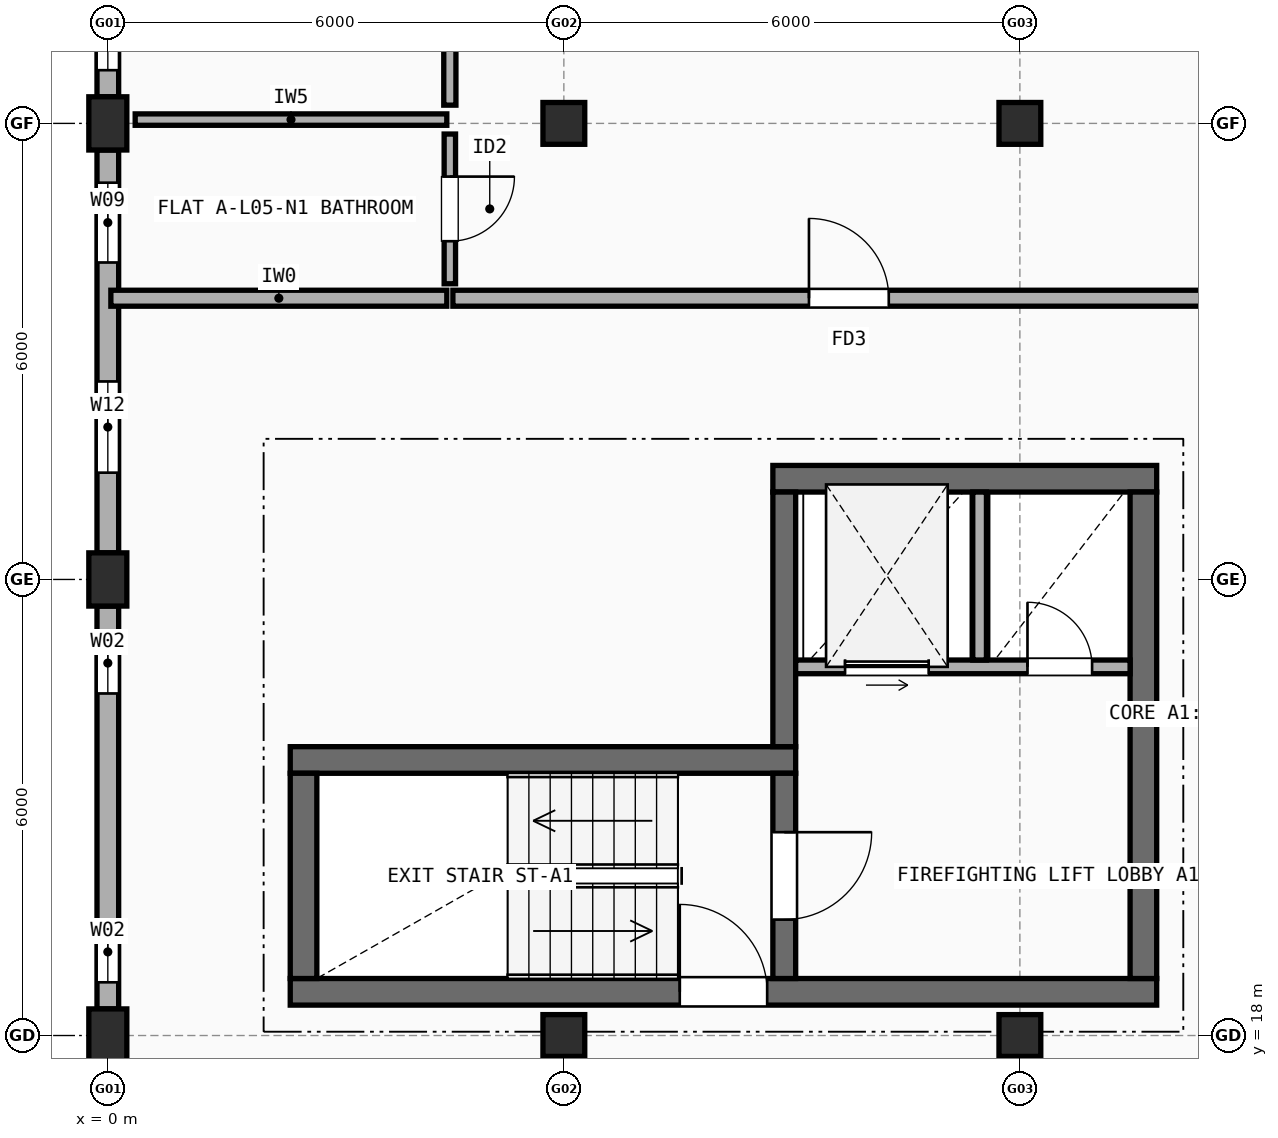
"""IFC4 building model, lengths in metres.
Left out: names, types, materials, properties, quantities, classifications, styles, units other than length and angle.
Written with IfcOpenShell. Run it as: python <this file> out.ifc"""

import sys

from ifc_helpers import new_model, si_unit, direction, frame, frame_2d, origin, origin_2d, place, context, subcontext, project, spatial, rectangle, extrude, element, fill, save


model = new_model("IFC4")
c1 = context("Model", 3, precision=1e-05, world=origin(), true_north=direction((0.0, 1.0)))
c2 = subcontext(c1, "Body", "Model", "MODEL_VIEW")
j1 = project(units=[si_unit("LENGTHUNIT", "METRE"), si_unit("PLANEANGLEUNIT", "RADIAN")], contexts=[c1])
p1 = place(None, origin())
s1 = spatial("IfcSite", under=j1, at=p1, CompositionType="ELEMENT")
p2 = place(p1, origin())
s2 = spatial("IfcBuilding", under=s1, at=p2, CompositionType="ELEMENT")
p3 = place(p2, frame((0.0, 0.0, 17.3)))
s3 = spatial("IfcBuildingStorey", under=s2, at=p3, CompositionType="ELEMENT", Elevation=17.3)
for number, where, z_axis, x_axis in (
    (1, (0.0, 18.0, 0.0), (0.0, 0.0, 1.0), (1.0, 0.0, 0.0)),
    (2, (0.0, 24.0, 0.0), (0.0, 0.0, 1.0), (1.0, 0.0, 0.0)),
    (3, (0.0, 30.0, 0.0), (0.0, 0.0, 1.0), (1.0, 0.0, 0.0)),
):
    element("IfcColumn", number, at=place(p3, frame(where, z_axis=z_axis, x_axis=x_axis)), inside=s3, PredefinedType="COLUMN", context=c2, shape_type="SweptSolid", body=[
        extrude(rectangle(XDim=0.5, YDim=0.7, at=origin_2d()), origin(), (0.0, 0.0, 1.0), 2.965),
    ])
for number, where, z_axis, x_axis in (
    (4, (6.0, 18.0, 0.0), (0.0, 0.0, 1.0), (1.0, 0.0, 0.0)),
    (5, (6.0, 30.0, 0.0), (0.0, 0.0, 1.0), (1.0, 0.0, 0.0)),
    (6, (12.0, 18.0, 0.0), (0.0, 0.0, 1.0), (1.0, 0.0, 0.0)),
    (7, (12.0, 30.0, 0.0), (0.0, 0.0, 1.0), (1.0, 0.0, 0.0)),
):
    element("IfcColumn", number, at=place(p3, frame(where, z_axis=z_axis, x_axis=x_axis)), inside=s3, PredefinedType="COLUMN", context=c2, shape_type="SweptSolid", body=[
        extrude(rectangle(XDim=0.55, YDim=0.55, at=origin_2d()), origin(), (0.0, 0.0, 1.0), 2.965),
    ])
p4 = place(p3, frame((0.0, 35.65, 0.0), z_axis=(0.0, 0.0, 1.0), x_axis=(0.0, -1.0, 0.0)))
e8 = element("IfcWall", 8, at=p4, inside=s3, PredefinedType="STANDARD", context=c2, shape_type="SweptSolid", body=[
    extrude(rectangle(XDim=5.3, YDim=0.285, at=frame_2d((2.65, 0.0))), origin(), (0.0, 0.0, 1.0), 2.447),
])
p5 = place(p4, frame((0.35, 0.0, 0.9)))
e9 = element("IfcOpeningElement", 9, at=p5, cuts=e8, PredefinedType="OPENING", context=c2, shape_type="SweptSolid", body=[
    extrude(rectangle(XDim=0.9, YDim=1.3, at=frame_2d((0.45, 0.65))), frame((0.0, 0.152, 0.0), z_axis=(0.0, -1.0, 0.0), x_axis=(1.0, 0.0, 0.0)), (0.0, 0.0, 1.0), 0.305),
])
p6 = place(p4, frame((4.05, 0.0, 0.9)))
e10 = element("IfcOpeningElement", 10, at=p6, cuts=e8, PredefinedType="OPENING", context=c2, shape_type="SweptSolid", body=[
    extrude(rectangle(XDim=0.9, YDim=1.3, at=frame_2d((0.45, 0.65))), frame((0.0, 0.152, 0.0), z_axis=(0.0, -1.0, 0.0), x_axis=(1.0, 0.0, 0.0)), (0.0, 0.0, 1.0), 0.305),
])
p7 = place(p3, frame((0.0, 29.65, 0.0), z_axis=(0.0, 0.0, 1.0), x_axis=(0.0, -1.0, 0.0)))
e11 = element("IfcWall", 11, at=p7, inside=s3, PredefinedType="STANDARD", context=c2, shape_type="SweptSolid", body=[
    extrude(rectangle(XDim=5.3, YDim=0.285, at=frame_2d((2.65, 0.0))), origin(), (0.0, 0.0, 1.0), 2.447),
])
p8 = place(p7, frame((0.43, 0.0, 0.9)))
e12 = element("IfcOpeningElement", 12, at=p8, cuts=e11, PredefinedType="OPENING", context=c2, shape_type="SweptSolid", body=[
    extrude(rectangle(XDim=1.05, YDim=1.35, at=frame_2d((0.525, 0.675))), frame((0.0, 0.152, 0.0), z_axis=(0.0, -1.0, 0.0), x_axis=(1.0, 0.0, 0.0)), (0.0, 0.0, 1.0), 0.305),
])
p9 = place(p7, frame((3.045, 0.0, 0.9)))
e13 = element("IfcOpeningElement", 13, at=p9, cuts=e11, PredefinedType="OPENING", context=c2, shape_type="SweptSolid", body=[
    extrude(rectangle(XDim=1.2, YDim=1.35, at=frame_2d((0.6, 0.675))), frame((0.0, 0.152, 0.0), z_axis=(0.0, -1.0, 0.0), x_axis=(1.0, 0.0, 0.0)), (0.0, 0.0, 1.0), 0.305),
])
p10 = place(p3, frame((0.0, 23.65, 0.0), z_axis=(0.0, 0.0, 1.0), x_axis=(0.0, -1.0, 0.0)))
e14 = element("IfcWall", 14, at=p10, inside=s3, PredefinedType="STANDARD", context=c2, shape_type="SweptSolid", body=[
    extrude(rectangle(XDim=5.3, YDim=0.285, at=frame_2d((2.65, 0.0))), origin(), (0.0, 0.0, 1.0), 2.447),
])
p11 = place(p10, frame((0.35, 0.0, 0.9)))
e15 = element("IfcOpeningElement", 15, at=p11, cuts=e14, PredefinedType="OPENING", context=c2, shape_type="SweptSolid", body=[
    extrude(rectangle(XDim=0.8, YDim=1.2, at=frame_2d((0.4, 0.6))), frame((0.0, 0.152, 0.0), z_axis=(0.0, -1.0, 0.0), x_axis=(1.0, 0.0, 0.0)), (0.0, 0.0, 1.0), 0.305),
])
p12 = place(p10, frame((4.15, 0.0, 0.9)))
e16 = element("IfcOpeningElement", 16, at=p12, cuts=e14, PredefinedType="OPENING", context=c2, shape_type="SweptSolid", body=[
    extrude(rectangle(XDim=0.8, YDim=1.2, at=frame_2d((0.4, 0.6))), frame((0.0, 0.152, 0.0), z_axis=(0.0, -1.0, 0.0), x_axis=(1.0, 0.0, 0.0)), (0.0, 0.0, 1.0), 0.305),
])
p13 = place(p3, frame((2.4, 18.575, 0.0), z_axis=(0.0, 0.0, 1.0), x_axis=(1.0, 0.0, 0.0)))
e17 = element("IfcWall", 17, at=p13, inside=s3, PredefinedType="SHEAR", context=c2, shape_type="SweptSolid", body=[
    extrude(rectangle(XDim=11.4, YDim=0.35, at=frame_2d((5.7, 0.0))), origin(), (0.0, 0.0, 1.0), 2.965),
])
p14 = place(p13, frame((5.125, 0.0, 0.0)))
e18 = element("IfcOpeningElement", 18, at=p14, cuts=e17, PredefinedType="OPENING", context=c2, shape_type="SweptSolid", body=[
    extrude(rectangle(XDim=1.15, YDim=2.15, at=frame_2d((0.575, 1.075))), frame((0.0, 0.185, 0.0), z_axis=(0.0, -1.0, 0.0), x_axis=(1.0, 0.0, 0.0)), (0.0, 0.0, 1.0), 0.37),
])
p15 = place(p3, frame((9.05, 21.625, 0.0), z_axis=(0.0, 0.0, 1.0), x_axis=(-1.0, 0.0, 0.0)))
e19 = element("IfcWall", 19, at=p15, inside=s3, PredefinedType="SHEAR", context=c2, shape_type="SweptSolid", body=[
    extrude(rectangle(XDim=6.65, YDim=0.35, at=frame_2d((3.325, 0.0))), origin(), (0.0, 0.0, 1.0), 2.965),
])
p16 = place(p3, frame((2.575, 21.45, 0.0), z_axis=(0.0, 0.0, 1.0), x_axis=(0.0, -1.0, 0.0)))
e20 = element("IfcWall", 20, at=p16, inside=s3, PredefinedType="SHEAR", context=c2, shape_type="SweptSolid", body=[
    extrude(rectangle(XDim=2.7, YDim=0.35, at=frame_2d((1.35, 0.0))), origin(), (0.0, 0.0, 1.0), 2.965),
])
p17 = place(p3, frame((8.9, 18.75, 0.0), z_axis=(0.0, 0.0, 1.0), x_axis=(0.0, 1.0, 0.0)))
e21 = element("IfcWall", 21, at=p17, inside=s3, PredefinedType="SHEAR", context=c2, shape_type="SweptSolid", body=[
    extrude(rectangle(XDim=2.7, YDim=0.3, at=frame_2d((1.35, 0.0))), origin(), (0.0, 0.0, 1.0), 2.965),
])
p18 = place(p17, frame((0.775, 0.0, 0.0)))
e22 = element("IfcOpeningElement", 22, at=p18, cuts=e21, PredefinedType="OPENING", context=c2, shape_type="SweptSolid", body=[
    extrude(rectangle(XDim=1.15, YDim=2.15, at=frame_2d((0.575, 1.075))), frame((0.0, 0.16, 0.0), z_axis=(0.0, -1.0, 0.0), x_axis=(1.0, 0.0, 0.0)), (0.0, 0.0, 1.0), 0.32),
])
p19 = place(p3, frame((13.8, 25.325, 0.0), z_axis=(0.0, 0.0, 1.0), x_axis=(-1.0, 0.0, 0.0)))
e23 = element("IfcWall", 23, at=p19, inside=s3, PredefinedType="SHEAR", context=c2, shape_type="SweptSolid", body=[
    extrude(rectangle(XDim=5.05, YDim=0.35, at=frame_2d((2.525, 0.0))), origin(), (0.0, 0.0, 1.0), 2.965),
])
p20 = place(p3, frame((13.625, 18.75, 0.0), z_axis=(0.0, 0.0, 1.0), x_axis=(0.0, 1.0, 0.0)))
e24 = element("IfcWall", 24, at=p20, inside=s3, PredefinedType="SHEAR", context=c2, shape_type="SweptSolid", body=[
    extrude(rectangle(XDim=6.4, YDim=0.35, at=frame_2d((3.2, 0.0))), origin(), (0.0, 0.0, 1.0), 2.965),
])
p21 = place(p3, frame((8.9, 21.8, 0.0), z_axis=(0.0, 0.0, 1.0), x_axis=(0.0, 1.0, 0.0)))
e25 = element("IfcWall", 25, at=p21, inside=s3, PredefinedType="SHEAR", context=c2, shape_type="SweptSolid", body=[
    extrude(rectangle(XDim=3.35, YDim=0.3, at=frame_2d((1.675, 0.0))), origin(), (0.0, 0.0, 1.0), 2.965),
])
p22 = place(p3, frame((9.05, 22.85, 0.0), z_axis=(0.0, 0.0, 1.0), x_axis=(1.0, 0.0, 0.0)))
e26 = element("IfcWall", 26, at=p22, inside=s3, PredefinedType="SOLIDWALL", context=c2, shape_type="SweptSolid", body=[
    extrude(rectangle(XDim=4.4, YDim=0.18, at=frame_2d((2.2, 0.0))), origin(), (0.0, 0.0, 1.0), 2.965),
])
p23 = place(p22, frame((0.65, 0.0, 0.0)))
e27 = element("IfcOpeningElement", 27, at=p23, cuts=e26, PredefinedType="OPENING", context=c2, shape_type="SweptSolid", body=[
    extrude(rectangle(XDim=1.1, YDim=2.15, at=frame_2d((0.55, 1.075))), frame((0.0, 0.1, 0.0), z_axis=(0.0, -1.0, 0.0), x_axis=(1.0, 0.0, 0.0)), (0.0, 0.0, 1.0), 0.2),
])
p24 = place(p22, frame((3.05, 0.0, 0.0)))
e28 = element("IfcOpeningElement", 28, at=p24, cuts=e26, PredefinedType="OPENING", context=c2, shape_type="SweptSolid", body=[
    extrude(rectangle(XDim=0.85, YDim=2.1, at=frame_2d((0.425, 1.05))), frame((0.0, 0.1, 0.0), z_axis=(0.0, -1.0, 0.0), x_axis=(1.0, 0.0, 0.0)), (0.0, 0.0, 1.0), 0.2),
])
p25 = place(p3, frame((11.47, 22.94, 0.0), z_axis=(0.0, 0.0, 1.0), x_axis=(0.0, 1.0, 0.0)))
e29 = element("IfcWall", 29, at=p25, inside=s3, PredefinedType="SOLIDWALL", context=c2, shape_type="SweptSolid", body=[
    extrude(rectangle(XDim=2.21, YDim=0.18, at=frame_2d((1.105, 0.0))), origin(), (0.0, 0.0, 1.0), 2.965),
])
p26 = place(p3, frame((0.04, 27.7, 0.0), z_axis=(0.0, 0.0, 1.0), x_axis=(1.0, 0.0, 0.0)))
e30 = element("IfcWall", 30, at=p26, inside=s3, PredefinedType="SOLIDWALL", context=c2, shape_type="SweptSolid", body=[
    extrude(rectangle(XDim=4.42, YDim=0.21, at=frame_2d((2.21, 0.0))), origin(), (0.0, 0.0, 1.0), 2.447),
])
p27 = place(p3, frame((4.54, 27.7, 0.0), z_axis=(0.0, 0.0, 1.0), x_axis=(1.0, 0.0, 0.0)))
e31 = element("IfcWall", 31, at=p27, inside=s3, PredefinedType="SOLIDWALL", context=c2, shape_type="SweptSolid", body=[
    extrude(rectangle(XDim=10.42, YDim=0.21, at=frame_2d((5.21, 0.0))), origin(), (0.0, 0.0, 1.0), 2.508),
])
p28 = place(p27, frame((4.685, 0.0, 0.0)))
e32 = element("IfcOpeningElement", 32, at=p28, cuts=e31, PredefinedType="OPENING", context=c2, shape_type="SweptSolid", body=[
    extrude(rectangle(XDim=1.05, YDim=2.15, at=frame_2d((0.525, 1.075))), frame((0.0, 0.115, 0.0), z_axis=(0.0, -1.0, 0.0), x_axis=(1.0, 0.0, 0.0)), (0.0, 0.0, 1.0), 0.23),
])
p29 = place(p3, frame((4.5, 30.24, 0.0), z_axis=(0.0, 0.0, 1.0), x_axis=(0.0, 1.0, 0.0)))
e33 = element("IfcWall", 33, at=p29, inside=s3, PredefinedType="PLUMBINGWALL", context=c2, shape_type="SweptSolid", body=[
    extrude(rectangle(XDim=7.37, YDim=0.16, at=frame_2d((3.685, 0.0))), origin(), (0.0, 0.0, 1.0), 2.447),
])
p30 = place(p29, frame((3.245, 0.0, 0.0)))
e34 = element("IfcOpeningElement", 34, at=p30, cuts=e33, PredefinedType="OPENING", context=c2, shape_type="SweptSolid", body=[
    extrude(rectangle(XDim=0.88, YDim=2.1, at=frame_2d((0.44, 1.05))), frame((0.0, 0.09, 0.0), z_axis=(0.0, -1.0, 0.0), x_axis=(1.0, 0.0, 0.0)), (0.0, 0.0, 1.0), 0.18),
])
p31 = place(p3, frame((4.5, 27.89, 0.0), z_axis=(0.0, 0.0, 1.0), x_axis=(0.0, 1.0, 0.0)))
e35 = element("IfcWall", 35, at=p31, inside=s3, PredefinedType="PARTITIONING", context=c2, shape_type="SweptSolid", body=[
    extrude(rectangle(XDim=1.97, YDim=0.15, at=frame_2d((0.985, 0.0))), origin(), (0.0, 0.0, 1.0), 2.965),
])
p32 = place(p31, frame((0.56, 0.0, 0.0)))
e36 = element("IfcOpeningElement", 36, at=p32, cuts=e35, PredefinedType="OPENING", context=c2, shape_type="SweptSolid", body=[
    extrude(rectangle(XDim=0.85, YDim=2.1, at=frame_2d((0.425, 1.05))), frame((0.0, 0.085, 0.0), z_axis=(0.0, -1.0, 0.0), x_axis=(1.0, 0.0, 0.0)), (0.0, 0.0, 1.0), 0.17),
])
p33 = place(p3, frame((0.36, 30.05, 0.0), z_axis=(0.0, 0.0, 1.0), x_axis=(1.0, 0.0, 0.0)))
e37 = element("IfcWall", 37, at=p33, inside=s3, PredefinedType="PARTITIONING", context=c2, shape_type="SweptSolid", body=[
    extrude(rectangle(XDim=4.1, YDim=0.15, at=frame_2d((2.05, 0.0))), origin(), (0.0, 0.0, 1.0), 2.447),
])
p34 = place(p6, origin())
e38 = element("IfcWindow", 38, at=p34, inside=s3, PartitioningType="SINGLE_PANEL", PredefinedType="WINDOW", context=c2, shape_type="SweptSolid", body=[
    extrude(rectangle(XDim=0.9, YDim=1.3, at=frame_2d((0.45, 0.65))), frame((0.0, 0.03, 0.0), z_axis=(0.0, -1.0, 0.0), x_axis=(1.0, 0.0, 0.0)), (0.0, 0.0, 1.0), 0.06),
])
fill(e10, e38)
p35 = place(p8, origin())
e39 = element("IfcWindow", 39, at=p35, inside=s3, PartitioningType="SINGLE_PANEL", PredefinedType="WINDOW", context=c2, shape_type="SweptSolid", body=[
    extrude(rectangle(XDim=1.05, YDim=1.35, at=frame_2d((0.525, 0.675))), frame((0.0, 0.03, 0.0), z_axis=(0.0, -1.0, 0.0), x_axis=(1.0, 0.0, 0.0)), (0.0, 0.0, 1.0), 0.06),
])
fill(e12, e39)
p36 = place(p9, origin())
e40 = element("IfcWindow", 40, at=p36, inside=s3, PartitioningType="SINGLE_PANEL", PredefinedType="WINDOW", context=c2, shape_type="SweptSolid", body=[
    extrude(rectangle(XDim=1.2, YDim=1.35, at=frame_2d((0.6, 0.675))), frame((0.0, 0.03, 0.0), z_axis=(0.0, -1.0, 0.0), x_axis=(1.0, 0.0, 0.0)), (0.0, 0.0, 1.0), 0.06),
])
fill(e13, e40)
p37 = place(p11, origin())
e41 = element("IfcWindow", 41, at=p37, inside=s3, PartitioningType="SINGLE_PANEL", PredefinedType="WINDOW", context=c2, shape_type="SweptSolid", body=[
    extrude(rectangle(XDim=0.8, YDim=1.2, at=frame_2d((0.4, 0.6))), frame((0.0, 0.03, 0.0), z_axis=(0.0, -1.0, 0.0), x_axis=(1.0, 0.0, 0.0)), (0.0, 0.0, 1.0), 0.06),
])
fill(e15, e41)
p38 = place(p12, origin())
e42 = element("IfcWindow", 42, at=p38, inside=s3, PartitioningType="SINGLE_PANEL", PredefinedType="WINDOW", context=c2, shape_type="SweptSolid", body=[
    extrude(rectangle(XDim=0.8, YDim=1.2, at=frame_2d((0.4, 0.6))), frame((0.0, 0.03, 0.0), z_axis=(0.0, -1.0, 0.0), x_axis=(1.0, 0.0, 0.0)), (0.0, 0.0, 1.0), 0.06),
])
fill(e16, e42)
p39 = place(p14, origin())
e43 = element("IfcDoor", 43, at=p39, inside=s3, OperationType="SINGLE_SWING_LEFT", PredefinedType="DOOR", context=c2, shape_type="SweptSolid", body=[
    extrude(rectangle(XDim=1.15, YDim=2.15, at=frame_2d((0.575, 1.075))), frame((0.0, 0.025, 0.0), z_axis=(0.0, -1.0, 0.0), x_axis=(1.0, 0.0, 0.0)), (0.0, 0.0, 1.0), 0.05),
])
fill(e18, e43)
p40 = place(p18, origin())
e44 = element("IfcDoor", 44, at=p40, inside=s3, OperationType="SINGLE_SWING_RIGHT", PredefinedType="DOOR", context=c2, shape_type="SweptSolid", body=[
    extrude(rectangle(XDim=1.15, YDim=2.15, at=frame_2d((0.575, 1.075))), frame((0.0, 0.025, 0.0), z_axis=(0.0, -1.0, 0.0), x_axis=(1.0, 0.0, 0.0)), (0.0, 0.0, 1.0), 0.05),
])
fill(e22, e44)
p41 = place(p23, origin())
e45 = element("IfcDoor", 45, at=p41, inside=s3, OperationType="SLIDING_TO_LEFT", PredefinedType="DOOR", context=c2, shape_type="SweptSolid", body=[
    extrude(rectangle(XDim=1.1, YDim=2.15, at=frame_2d((0.55, 1.075))), frame((0.0, 0.025, 0.0), z_axis=(0.0, -1.0, 0.0), x_axis=(1.0, 0.0, 0.0)), (0.0, 0.0, 1.0), 0.05),
])
fill(e27, e45)
p42 = place(p24, frame((0.85, 0.0, 0.0), z_axis=(0.0, 0.0, 1.0), x_axis=(-1.0, 0.0, 0.0)))
e46 = element("IfcDoor", 46, at=p42, inside=s3, OperationType="SINGLE_SWING_LEFT", PredefinedType="DOOR", context=c2, shape_type="SweptSolid", body=[
    extrude(rectangle(XDim=0.85, YDim=2.1, at=frame_2d((0.425, 1.05))), frame((0.0, 0.025, 0.0), z_axis=(0.0, -1.0, 0.0), x_axis=(1.0, 0.0, 0.0)), (0.0, 0.0, 1.0), 0.05),
])
fill(e28, e46)
p43 = place(p28, origin())
e47 = element("IfcDoor", 47, at=p43, inside=s3, OperationType="SINGLE_SWING_LEFT", PredefinedType="DOOR", context=c2, shape_type="SweptSolid", body=[
    extrude(rectangle(XDim=1.05, YDim=2.15, at=frame_2d((0.525, 1.075))), frame((0.0, 0.025, 0.0), z_axis=(0.0, -1.0, 0.0), x_axis=(1.0, 0.0, 0.0)), (0.0, 0.0, 1.0), 0.05),
])
fill(e32, e47)
p44 = place(p32, origin())
e48 = element("IfcDoor", 48, at=p44, inside=s3, OperationType="SINGLE_SWING_RIGHT", PredefinedType="DOOR", context=c2, shape_type="SweptSolid", body=[
    extrude(rectangle(XDim=0.85, YDim=2.1, at=frame_2d((0.425, 1.05))), frame((0.0, 0.025, 0.0), z_axis=(0.0, -1.0, 0.0), x_axis=(1.0, 0.0, 0.0)), (0.0, 0.0, 1.0), 0.05),
])
fill(e36, e48)
save(model, sys.argv[1])
